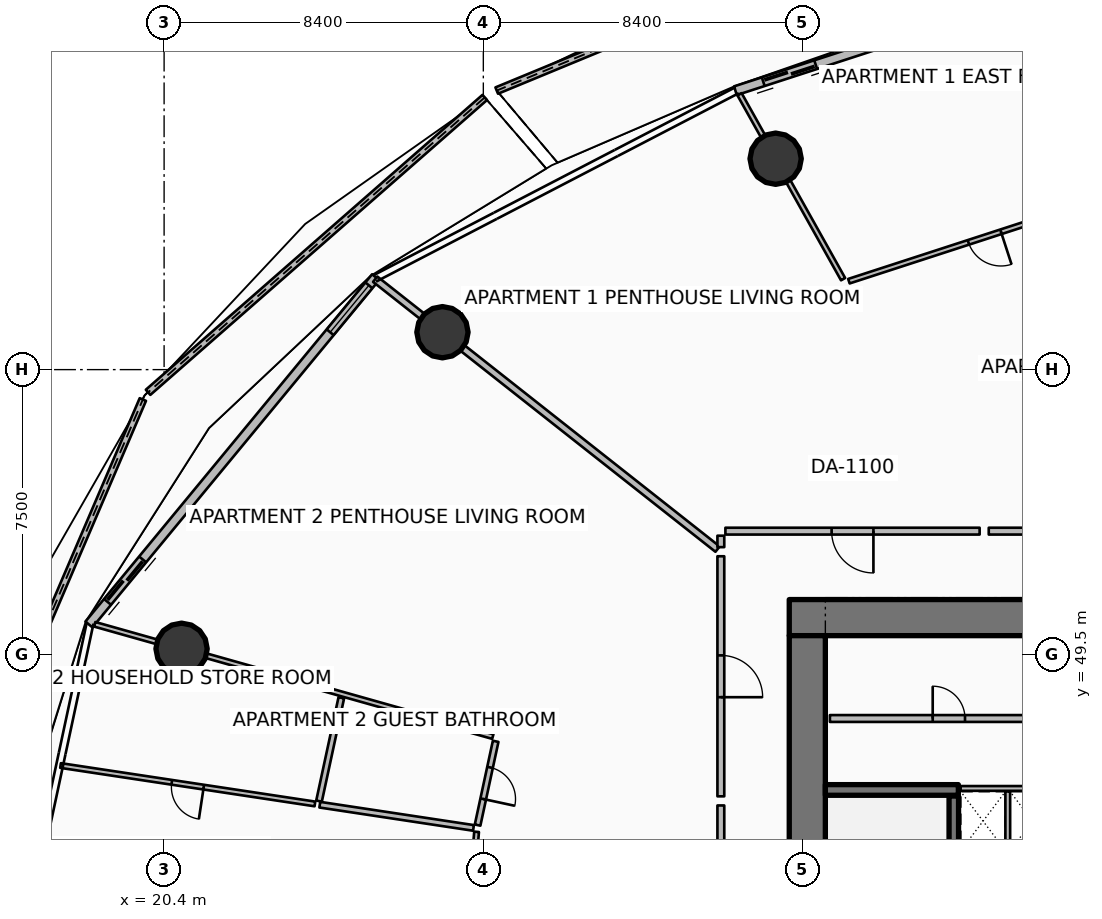
"""IFC4 building model, lengths in metres.
Left out: names, types, materials, properties, quantities, classifications, styles, units other than length and angle.
Written with IfcOpenShell. Run it as: python <this file> out.ifc"""

import sys

from ifc_helpers import new_model, si_unit, direction, frame, frame_2d, origin, origin_2d, place, context, subcontext, project, spatial, polyline, rectangle, circle, outline, extrude, element, fill, save


model = new_model("IFC4")
c1 = context("Model", 3, precision=1e-05, world=origin(), true_north=direction((0.0, 1.0)))
c2 = subcontext(c1, "Body", "Model", "MODEL_VIEW")
j1 = project(units=[si_unit("LENGTHUNIT", "METRE"), si_unit("PLANEANGLEUNIT", "RADIAN")], contexts=[c1])
p1 = place(None, origin())
s1 = spatial("IfcSite", under=j1, at=p1, CompositionType="ELEMENT")
p2 = place(p1, origin())
s2 = spatial("IfcBuilding", under=s1, at=p2, CompositionType="ELEMENT")
p3 = place(p2, frame((0.0, 0.0, 56.4)))
s3 = spatial("IfcBuildingStorey", under=s2, at=p3, CompositionType="ELEMENT", Elevation=56.4)
p4 = place(p3, frame((36.85, 50.475, 0.0), z_axis=(0.0, 0.0, 1.0), x_axis=(1.0, 0.0, 0.0)))
e1 = element("IfcWall", 1, at=p4, inside=s3, PredefinedType="SHEAR", context=c2, shape_type="SweptSolid", body=[
    extrude(rectangle(XDim=10.05, YDim=0.95, at=frame_2d((5.025, 0.0))), origin(), (0.0, 0.0, 1.0), 3.75),
])
p5 = place(p3, frame((37.325, 34.0, 0.0), z_axis=(0.0, 0.0, 1.0), x_axis=(0.0, 1.0, 0.0)))
e2 = element("IfcWall", 2, at=p5, inside=s3, PredefinedType="SHEAR", context=c2, shape_type="SweptSolid", body=[
    extrude(rectangle(XDim=16.0, YDim=0.95, at=frame_2d((8.0, 0.0))), origin(), (0.0, 0.0, 1.0), 3.75),
])
p6 = place(p3, frame((37.8, 45.94, 0.0), z_axis=(0.0, 0.0, 1.0), x_axis=(1.0, 0.0, 0.0)))
e3 = element("IfcWall", 3, at=p6, inside=s3, PredefinedType="SHEAR", context=c2, shape_type="SweptSolid", body=[
    extrude(rectangle(XDim=3.5, YDim=0.28, at=frame_2d((1.75, 0.0))), origin(), (0.0, 0.0, 1.0), 3.75),
])
for number, where, z_axis, x_axis in (
    (4, (36.492, 62.55, 0.0), (0.0, 0.0, 1.0), (1.0, 0.0, 0.0)),
    (5, (27.724, 57.984, 0.0), (0.0, 0.0, 1.0), (1.0, 0.0, 0.0)),
    (6, (20.859, 49.655, 0.0), (0.0, 0.0, 1.0), (1.0, 0.0, 0.0)),
):
    element("IfcColumn", number, at=place(p3, frame(where, z_axis=z_axis, x_axis=x_axis)), inside=s3, PredefinedType="COLUMN", context=c2, shape_type="SweptSolid", body=[
        extrude(circle(Radius=0.675, at=origin_2d()), origin(), (0.0, 0.0, 1.0), 3.5),
    ])
p7 = place(p3, frame((39.258, 68.518, 0.0), z_axis=(0.0, 0.0, 1.0), x_axis=(-0.924219630584, -0.381861328813, 0.0)))
e7 = element("IfcWall", 7, at=p7, inside=s3, PredefinedType="PARAPET", context=c2, shape_type="SweptSolid", body=[
    extrude(outline(polyline([(0.0, 0.0), (10.934, 0.0), (10.934, 1.756), (5.467, 1.853), (0.0, 1.832), (0.0, 0.0)])), frame((0.0, 0.09, 0.0), z_axis=(0.0, -1.0, 0.0), x_axis=(1.0, 0.0, 0.0)), (0.0, 0.0, 1.0), 0.18),
])
p8 = place(p3, frame((28.837, 64.161, 0.0), z_axis=(0.0, 0.0, 1.0), x_axis=(-0.752310783683, -0.658808382426, 0.0)))
e8 = element("IfcWall", 8, at=p8, inside=s3, PredefinedType="PARAPET", context=c2, shape_type="SweptSolid", body=[
    extrude(outline(polyline([(0.0, 0.0), (11.776, 0.0), (11.776, 1.348), (5.888, 1.562), (0.0, 1.747), (0.0, 0.0)])), frame((0.0, 0.09, 0.0), z_axis=(0.0, -1.0, 0.0), x_axis=(1.0, 0.0, 0.0)), (0.0, 0.0, 1.0), 0.18),
])
p9 = place(p3, frame((19.841, 56.214, 0.0), z_axis=(0.0, 0.0, 1.0), x_axis=(-0.393762615554, -0.919212164079, 0.0)))
e9 = element("IfcWall", 9, at=p9, inside=s3, PredefinedType="PARAPET", context=c2, shape_type="SweptSolid", body=[
    extrude(outline(polyline([(0.0, 0.0), (12.412, 0.0), (12.412, 1.12), (6.206, 1.182), (0.0, 1.348), (0.0, 0.0)])), frame((0.0, 0.09, 0.0), z_axis=(0.0, -1.0, 0.0), x_axis=(1.0, 0.0, 0.0)), (0.0, 0.0, 1.0), 0.18),
])
p10 = place(p3, frame((45.036, 67.458, 0.0), z_axis=(0.0, 0.0, 1.0), x_axis=(-0.951054679225, -0.309022648238, 0.0)))
e10 = element("IfcWall", 10, at=p10, inside=s3, PredefinedType="SOLIDWALL", context=c2, shape_type="SweptSolid", body=[
    extrude(rectangle(XDim=10.097, YDim=0.24, at=frame_2d((5.048, 0.0))), origin(), (0.0, 0.0, 1.0), 2.45),
])
p11 = place(p10, frame((7.877, 0.0, 0.0)))
e11 = element("IfcOpeningElement", 11, at=p11, cuts=e10, PredefinedType="OPENING", context=c2, shape_type="SweptSolid", body=[
    extrude(rectangle(XDim=1.45, YDim=2.15, at=frame_2d((0.725, 1.075))), frame((0.0, 0.13, 0.0), z_axis=(0.0, -1.0, 0.0), x_axis=(1.0, 0.0, 0.0)), (0.0, 0.0, 1.0), 0.26),
])
p12 = place(p10, frame((0.28, 0.0, 0.65)))
e12 = element("IfcOpeningElement", 12, at=p12, cuts=e10, PredefinedType="OPENING", context=c2, shape_type="SweptSolid", body=[
    extrude(rectangle(XDim=1.6, YDim=1.5, at=frame_2d((0.8, 0.75))), frame((0.0, 0.13, 0.0), z_axis=(0.0, -1.0, 0.0), x_axis=(1.0, 0.0, 0.0)), (0.0, 0.0, 1.0), 0.26),
])
p13 = place(p3, frame((25.967, 59.433, 0.0), z_axis=(0.0, 0.0, 1.0), x_axis=(-0.636674332663, -0.771132799281, 0.0)))
e13 = element("IfcWall", 13, at=p13, inside=s3, PredefinedType="SOLIDWALL", context=c2, shape_type="SweptSolid", body=[
    extrude(rectangle(XDim=11.851, YDim=0.24, at=frame_2d((5.926, 0.0))), origin(), (0.0, 0.0, 1.0), 2.45),
])
p14 = place(p13, frame((9.631, 0.0, 0.0)))
e14 = element("IfcOpeningElement", 14, at=p14, cuts=e13, PredefinedType="OPENING", context=c2, shape_type="SweptSolid", body=[
    extrude(rectangle(XDim=1.45, YDim=2.15, at=frame_2d((0.725, 1.075))), frame((0.0, 0.13, 0.0), z_axis=(0.0, -1.0, 0.0), x_axis=(1.0, 0.0, 0.0)), (0.0, 0.0, 1.0), 0.26),
])
p15 = place(p13, frame((0.28, 0.0, 0.65)))
e15 = element("IfcOpeningElement", 15, at=p15, cuts=e13, PredefinedType="OPENING", context=c2, shape_type="SweptSolid", body=[
    extrude(rectangle(XDim=1.6, YDim=1.5, at=frame_2d((0.8, 0.75))), frame((0.0, 0.13, 0.0), z_axis=(0.0, -1.0, 0.0), x_axis=(1.0, 0.0, 0.0)), (0.0, 0.0, 1.0), 0.26),
])
p16 = place(p3, frame((41.18, 38.22, 0.0), z_axis=(0.0, 0.0, 1.0), x_axis=(0.0, 1.0, 0.0)))
e16 = element("IfcWall", 16, at=p16, inside=s3, PredefinedType="SOLIDWALL", context=c2, shape_type="SweptSolid", body=[
    extrude(rectangle(XDim=7.56, YDim=0.25, at=frame_2d((3.78, 0.0))), origin(), (0.0, 0.0, 1.0), 3.5),
])
p17 = place(p16, frame((0.3, 0.0, 0.0)))
e17 = element("IfcOpeningElement", 17, at=p17, cuts=e16, PredefinedType="OPENING", context=c2, shape_type="SweptSolid", body=[
    extrude(rectangle(XDim=1.55, YDim=2.15, at=frame_2d((0.775, 1.075))), frame((0.0, 0.135, 0.0), z_axis=(0.0, -1.0, 0.0), x_axis=(1.0, 0.0, 0.0)), (0.0, 0.0, 1.0), 0.27),
])
p18 = place(p3, frame((37.92, 47.82, 0.0), z_axis=(0.0, 0.0, 1.0), x_axis=(1.0, 0.0, 0.0)))
e18 = element("IfcWall", 18, at=p18, inside=s3, PredefinedType="PARTITIONING", context=c2, shape_type="SweptSolid", body=[
    extrude(rectangle(XDim=6.26, YDim=0.18, at=frame_2d((3.13, 0.0))), origin(), (0.0, 0.0, 1.0), 3.5),
])
p19 = place(p18, frame((2.705, 0.0, 0.0)))
e19 = element("IfcOpeningElement", 19, at=p19, cuts=e18, PredefinedType="OPENING", context=c2, shape_type="SweptSolid", body=[
    extrude(rectangle(XDim=0.85, YDim=2.06, at=frame_2d((0.425, 1.03))), frame((0.0, 0.1, 0.0), z_axis=(0.0, -1.0, 0.0), x_axis=(1.0, 0.0, 0.0)), (0.0, 0.0, 1.0), 0.2),
])
p20 = place(p3, frame((41.36, 45.98, 0.0), z_axis=(0.0, 0.0, 1.0), x_axis=(1.0, 0.0, 0.0)))
e20 = element("IfcWall", 20, at=p20, inside=s3, PredefinedType="PARTITIONING", context=c2, shape_type="SweptSolid", body=[
    extrude(rectangle(XDim=5.36, YDim=0.125, at=frame_2d((2.68, 0.0))), origin(), (0.0, 0.0, 1.0), 2.94),
])
p21 = place(p3, frame((42.6, 44.35, 0.0), z_axis=(0.0, 0.0, 1.0), x_axis=(0.0, 1.0, 0.0)))
e21 = element("IfcWall", 21, at=p21, inside=s3, PredefinedType="PARTITIONING", context=c2, shape_type="SweptSolid", body=[
    extrude(rectangle(XDim=1.55, YDim=0.125, at=frame_2d((0.775, 0.0))), origin(), (0.0, 0.0, 1.0), 2.94),
])
p22 = place(p3, frame((34.964, 52.277, 0.0), z_axis=(0.0, 0.0, 1.0), x_axis=(-0.785321098315, 0.619088662908, 0.0)))
e22 = element("IfcWall", 22, at=p22, inside=s3, PredefinedType="PARTITIONING", context=c2, shape_type="SweptSolid", body=[
    extrude(rectangle(XDim=11.472, YDim=0.18, at=frame_2d((5.736, 0.0))), origin(), (0.0, 0.0, 1.0), 2.867),
])
p23 = place(p3, frame((41.86, 52.75, 0.0), z_axis=(0.0, 0.0, 1.0), x_axis=(-1.0, 0.0, 0.0)))
e23 = element("IfcWall", 23, at=p23, inside=s3, PredefinedType="PARTITIONING", context=c2, shape_type="SweptSolid", body=[
    extrude(rectangle(XDim=6.69, YDim=0.18, at=frame_2d((3.345, 0.0))), origin(), (0.0, 0.0, 1.0), 2.867),
])
p24 = place(p23, frame((2.795, 0.0, 0.0)))
e24 = element("IfcOpeningElement", 24, at=p24, cuts=e23, PredefinedType="OPENING", context=c2, shape_type="SweptSolid", body=[
    extrude(rectangle(XDim=1.1, YDim=2.1, at=frame_2d((0.55, 1.05))), frame((0.0, 0.1, 0.0), z_axis=(0.0, -1.0, 0.0), x_axis=(1.0, 0.0, 0.0)), (0.0, 0.0, 1.0), 0.2),
])
p25 = place(p3, frame((35.05, 52.63, 0.0), z_axis=(0.0, 0.0, 1.0), x_axis=(0.0, -1.0, 0.0)))
e25 = element("IfcWall", 25, at=p25, inside=s3, PredefinedType="PARTITIONING", context=c2, shape_type="SweptSolid", body=[
    extrude(rectangle(XDim=0.301, YDim=0.18, at=frame_2d((0.15, 0.0))), origin(), (0.0, 0.0, 1.0), 2.867),
])
p26 = place(p3, frame((46.608, 52.75, 0.0), z_axis=(0.0, 0.0, 1.0), x_axis=(-1.0, 0.0, 0.0)))
e26 = element("IfcWall", 26, at=p26, inside=s3, PredefinedType="PARTITIONING", context=c2, shape_type="SweptSolid", body=[
    extrude(rectangle(XDim=4.508, YDim=0.18, at=frame_2d((2.254, 0.0))), origin(), (0.0, 0.0, 1.0), 2.867),
])
p27 = place(p3, frame((38.267, 59.38, 0.0), z_axis=(0.0, 0.0, 1.0), x_axis=(-0.488618035608, 0.872497802449, 0.0)))
e27 = element("IfcWall", 27, at=p27, inside=s3, PredefinedType="PARTITIONING", context=c2, shape_type="SweptSolid", body=[
    extrude(rectangle(XDim=5.576, YDim=0.125, at=frame_2d((2.788, 0.0))), origin(), (0.0, 0.0, 1.0), 2.867),
])
p28 = place(p3, frame((45.566, 61.649, 0.0), z_axis=(0.0, 0.0, 1.0), x_axis=(-0.951057228592, -0.309014802142, 0.0)))
e28 = element("IfcWall", 28, at=p28, inside=s3, PredefinedType="PARTITIONING", context=c2, shape_type="SweptSolid", body=[
    extrude(rectangle(XDim=7.513, YDim=0.125, at=frame_2d((3.757, 0.0))), origin(), (0.0, 0.0, 1.0), 2.867),
])
p29 = place(p28, frame((3.307, 0.0, 0.0)))
e29 = element("IfcOpeningElement", 29, at=p29, cuts=e28, PredefinedType="OPENING", context=c2, shape_type="SweptSolid", body=[
    extrude(rectangle(XDim=0.9, YDim=2.08, at=frame_2d((0.45, 1.04))), frame((0.0, 0.073, 0.0), z_axis=(0.0, -1.0, 0.0), x_axis=(1.0, 0.0, 0.0)), (0.0, 0.0, 1.0), 0.145),
])
p30 = place(p3, frame((35.05, 52.089, 0.0), z_axis=(0.0, 0.0, 1.0), x_axis=(0.0, -1.0, 0.0)))
e30 = element("IfcWall", 30, at=p30, inside=s3, PredefinedType="PARTITIONING", context=c2, shape_type="SweptSolid", body=[
    extrude(rectangle(XDim=6.317, YDim=0.18, at=frame_2d((3.158, 0.0))), origin(), (0.0, 0.0, 1.0), 2.867),
])
p31 = place(p30, frame((2.608, 0.0, 0.0)))
e31 = element("IfcOpeningElement", 31, at=p31, cuts=e30, PredefinedType="OPENING", context=c2, shape_type="SweptSolid", body=[
    extrude(rectangle(XDim=1.1, YDim=2.1, at=frame_2d((0.55, 1.05))), frame((0.0, 0.1, 0.0), z_axis=(0.0, -1.0, 0.0), x_axis=(1.0, 0.0, 0.0)), (0.0, 0.0, 1.0), 0.2),
])
p32 = place(p3, frame((35.05, 45.532, 0.0), z_axis=(0.0, 0.0, 1.0), x_axis=(0.0, -1.0, 0.0)))
e32 = element("IfcWall", 32, at=p32, inside=s3, PredefinedType="PARTITIONING", context=c2, shape_type="SweptSolid", body=[
    extrude(rectangle(XDim=4.945, YDim=0.18, at=frame_2d((2.472, 0.0))), origin(), (0.0, 0.0, 1.0), 2.867),
])
p33 = place(p3, frame((29.049, 47.344, 0.0), z_axis=(0.0, 0.0, 1.0), x_axis=(-0.962452831434, 0.271448977278, 0.0)))
e33 = element("IfcWall", 33, at=p33, inside=s3, PredefinedType="PARTITIONING", context=c2, shape_type="SweptSolid", body=[
    extrude(rectangle(XDim=10.885, YDim=0.125, at=frame_2d((5.442, 0.0))), origin(), (0.0, 0.0, 1.0), 2.867),
])
p34 = place(p3, frame((29.125, 47.22, 0.0), z_axis=(0.0, 0.0, 1.0), x_axis=(-0.210919017848, -0.977503538567, 0.0)))
e34 = element("IfcWall", 34, at=p34, inside=s3, PredefinedType="PARTITIONING", context=c2, shape_type="SweptSolid", body=[
    extrude(rectangle(XDim=2.255, YDim=0.15, at=frame_2d((1.127, 0.0))), origin(), (0.0, 0.0, 1.0), 2.867),
])
p35 = place(p34, frame((0.702, 0.0, 0.0)))
e35 = element("IfcOpeningElement", 35, at=p35, cuts=e34, PredefinedType="OPENING", context=c2, shape_type="SweptSolid", body=[
    extrude(rectangle(XDim=0.85, YDim=2.06, at=frame_2d((0.425, 1.03))), frame((0.0, 0.085, 0.0), z_axis=(0.0, -1.0, 0.0), x_axis=(1.0, 0.0, 0.0)), (0.0, 0.0, 1.0), 0.17),
])
p36 = place(p3, frame((25.063, 48.365, 0.0), z_axis=(0.0, 0.0, 1.0), x_axis=(-0.210847740245, -0.97751891564, 0.0)))
e36 = element("IfcWall", 36, at=p36, inside=s3, PredefinedType="PARTITIONING", context=c2, shape_type="SweptSolid", body=[
    extrude(rectangle(XDim=2.781, YDim=0.15, at=frame_2d((1.391, 0.0))), origin(), (0.0, 0.0, 1.0), 2.867),
])
p37 = place(p3, frame((28.541, 44.941, 0.0), z_axis=(0.0, 0.0, 1.0), x_axis=(-0.988765818212, 0.149472929776, 0.0)))
e37 = element("IfcWall", 37, at=p37, inside=s3, PredefinedType="PARTITIONING", context=c2, shape_type="SweptSolid", body=[
    extrude(rectangle(XDim=4.09, YDim=0.15, at=frame_2d((2.045, 0.0))), origin(), (0.0, 0.0, 1.0), 2.94),
])
p38 = place(p3, frame((24.368, 45.572, 0.0), z_axis=(0.0, 0.0, 1.0), x_axis=(-0.988769342127, 0.149449617164, 0.0)))
e38 = element("IfcWall", 38, at=p38, inside=s3, PredefinedType="PARTITIONING", context=c2, shape_type="SweptSolid", body=[
    extrude(rectangle(XDim=6.77, YDim=0.125, at=frame_2d((3.385, 0.0))), origin(), (0.0, 0.0, 1.0), 2.94),
])
p39 = place(p38, frame((2.96, 0.0, 0.0)))
e39 = element("IfcOpeningElement", 39, at=p39, cuts=e38, PredefinedType="OPENING", context=c2, shape_type="SweptSolid", body=[
    extrude(rectangle(XDim=0.85, YDim=2.06, at=frame_2d((0.425, 1.03))), frame((0.0, 0.073, 0.0), z_axis=(0.0, -1.0, 0.0), x_axis=(1.0, 0.0, 0.0)), (0.0, 0.0, 1.0), 0.145),
])
p40 = place(p3, frame((28.623, 44.838, 0.0), z_axis=(0.0, 0.0, 1.0), x_axis=(-0.083662019613, -0.996494187878, 0.0)))
e40 = element("IfcWall", 40, at=p40, inside=s3, PredefinedType="PARTITIONING", context=c2, shape_type="SweptSolid", body=[
    extrude(rectangle(XDim=2.425, YDim=0.125, at=frame_2d((1.212, 0.0))), origin(), (0.0, 0.0, 1.0), 2.94),
])
p41 = place(p40, frame((0.788, 0.0, 0.0)))
e41 = element("IfcOpeningElement", 41, at=p41, cuts=e40, PredefinedType="OPENING", context=c2, shape_type="SweptSolid", body=[
    extrude(rectangle(XDim=0.85, YDim=2.06, at=frame_2d((0.425, 1.03))), frame((0.0, 0.073, 0.0), z_axis=(0.0, -1.0, 0.0), x_axis=(1.0, 0.0, 0.0)), (0.0, 0.0, 1.0), 0.145),
])
p42 = place(p11, origin())
e42 = element("IfcDoor", 42, at=p42, inside=s3, OperationType="DOUBLE_DOOR_SLIDING", PredefinedType="DOOR", context=c2, shape_type="SweptSolid", body=[
    extrude(rectangle(XDim=1.45, YDim=2.15, at=frame_2d((0.725, 1.075))), frame((0.0, 0.025, 0.0), z_axis=(0.0, -1.0, 0.0), x_axis=(1.0, 0.0, 0.0)), (0.0, 0.0, 1.0), 0.05),
])
fill(e11, e42)
p43 = place(p14, origin())
e43 = element("IfcDoor", 43, at=p43, inside=s3, OperationType="DOUBLE_DOOR_SLIDING", PredefinedType="DOOR", context=c2, shape_type="SweptSolid", body=[
    extrude(rectangle(XDim=1.45, YDim=2.15, at=frame_2d((0.725, 1.075))), frame((0.0, 0.025, 0.0), z_axis=(0.0, -1.0, 0.0), x_axis=(1.0, 0.0, 0.0)), (0.0, 0.0, 1.0), 0.05),
])
fill(e14, e43)
p44 = place(p15, origin())
e44 = element("IfcWindow", 44, at=p44, inside=s3, PartitioningType="SINGLE_PANEL", PredefinedType="WINDOW", context=c2, shape_type="SweptSolid", body=[
    extrude(rectangle(XDim=1.6, YDim=1.5, at=frame_2d((0.8, 0.75))), frame((0.0, 0.03, 0.0), z_axis=(0.0, -1.0, 0.0), x_axis=(1.0, 0.0, 0.0)), (0.0, 0.0, 1.0), 0.06),
])
fill(e15, e44)
p45 = place(p19, origin())
e45 = element("IfcDoor", 45, at=p45, inside=s3, OperationType="SINGLE_SWING_LEFT", PredefinedType="DOOR", context=c2, shape_type="SweptSolid", body=[
    extrude(rectangle(XDim=0.85, YDim=2.06, at=frame_2d((0.425, 1.03))), frame((0.0, 0.025, 0.0), z_axis=(0.0, -1.0, 0.0), x_axis=(1.0, 0.0, 0.0)), (0.0, 0.0, 1.0), 0.05),
])
fill(e19, e45)
p46 = place(p24, origin())
e46 = element("IfcDoor", 46, at=p46, inside=s3, OperationType="SINGLE_SWING_LEFT", PredefinedType="DOOR", context=c2, shape_type="SweptSolid", body=[
    extrude(rectangle(XDim=1.1, YDim=2.1, at=frame_2d((0.55, 1.05))), frame((0.0, 0.025, 0.0), z_axis=(0.0, -1.0, 0.0), x_axis=(1.0, 0.0, 0.0)), (0.0, 0.0, 1.0), 0.05),
])
fill(e24, e46)
p47 = place(p29, origin())
e47 = element("IfcDoor", 47, at=p47, inside=s3, OperationType="SINGLE_SWING_LEFT", PredefinedType="DOOR", context=c2, shape_type="SweptSolid", body=[
    extrude(rectangle(XDim=0.9, YDim=2.08, at=frame_2d((0.45, 1.04))), frame((0.0, 0.025, 0.0), z_axis=(0.0, -1.0, 0.0), x_axis=(1.0, 0.0, 0.0)), (0.0, 0.0, 1.0), 0.05),
])
fill(e29, e47)
p48 = place(p31, origin())
e48 = element("IfcDoor", 48, at=p48, inside=s3, OperationType="SINGLE_SWING_RIGHT", PredefinedType="DOOR", context=c2, shape_type="SweptSolid", body=[
    extrude(rectangle(XDim=1.1, YDim=2.1, at=frame_2d((0.55, 1.05))), frame((0.0, 0.025, 0.0), z_axis=(0.0, -1.0, 0.0), x_axis=(1.0, 0.0, 0.0)), (0.0, 0.0, 1.0), 0.05),
])
fill(e31, e48)
p49 = place(p35, origin())
e49 = element("IfcDoor", 49, at=p49, inside=s3, OperationType="SINGLE_SWING_RIGHT", PredefinedType="DOOR", context=c2, shape_type="SweptSolid", body=[
    extrude(rectangle(XDim=0.85, YDim=2.06, at=frame_2d((0.425, 1.03))), frame((0.0, 0.025, 0.0), z_axis=(0.0, -1.0, 0.0), x_axis=(1.0, 0.0, 0.0)), (0.0, 0.0, 1.0), 0.05),
])
fill(e35, e49)
p50 = place(p39, origin())
e50 = element("IfcDoor", 50, at=p50, inside=s3, OperationType="SINGLE_SWING_LEFT", PredefinedType="DOOR", context=c2, shape_type="SweptSolid", body=[
    extrude(rectangle(XDim=0.85, YDim=2.06, at=frame_2d((0.425, 1.03))), frame((0.0, 0.025, 0.0), z_axis=(0.0, -1.0, 0.0), x_axis=(1.0, 0.0, 0.0)), (0.0, 0.0, 1.0), 0.05),
])
fill(e39, e50)
save(model, sys.argv[1])
